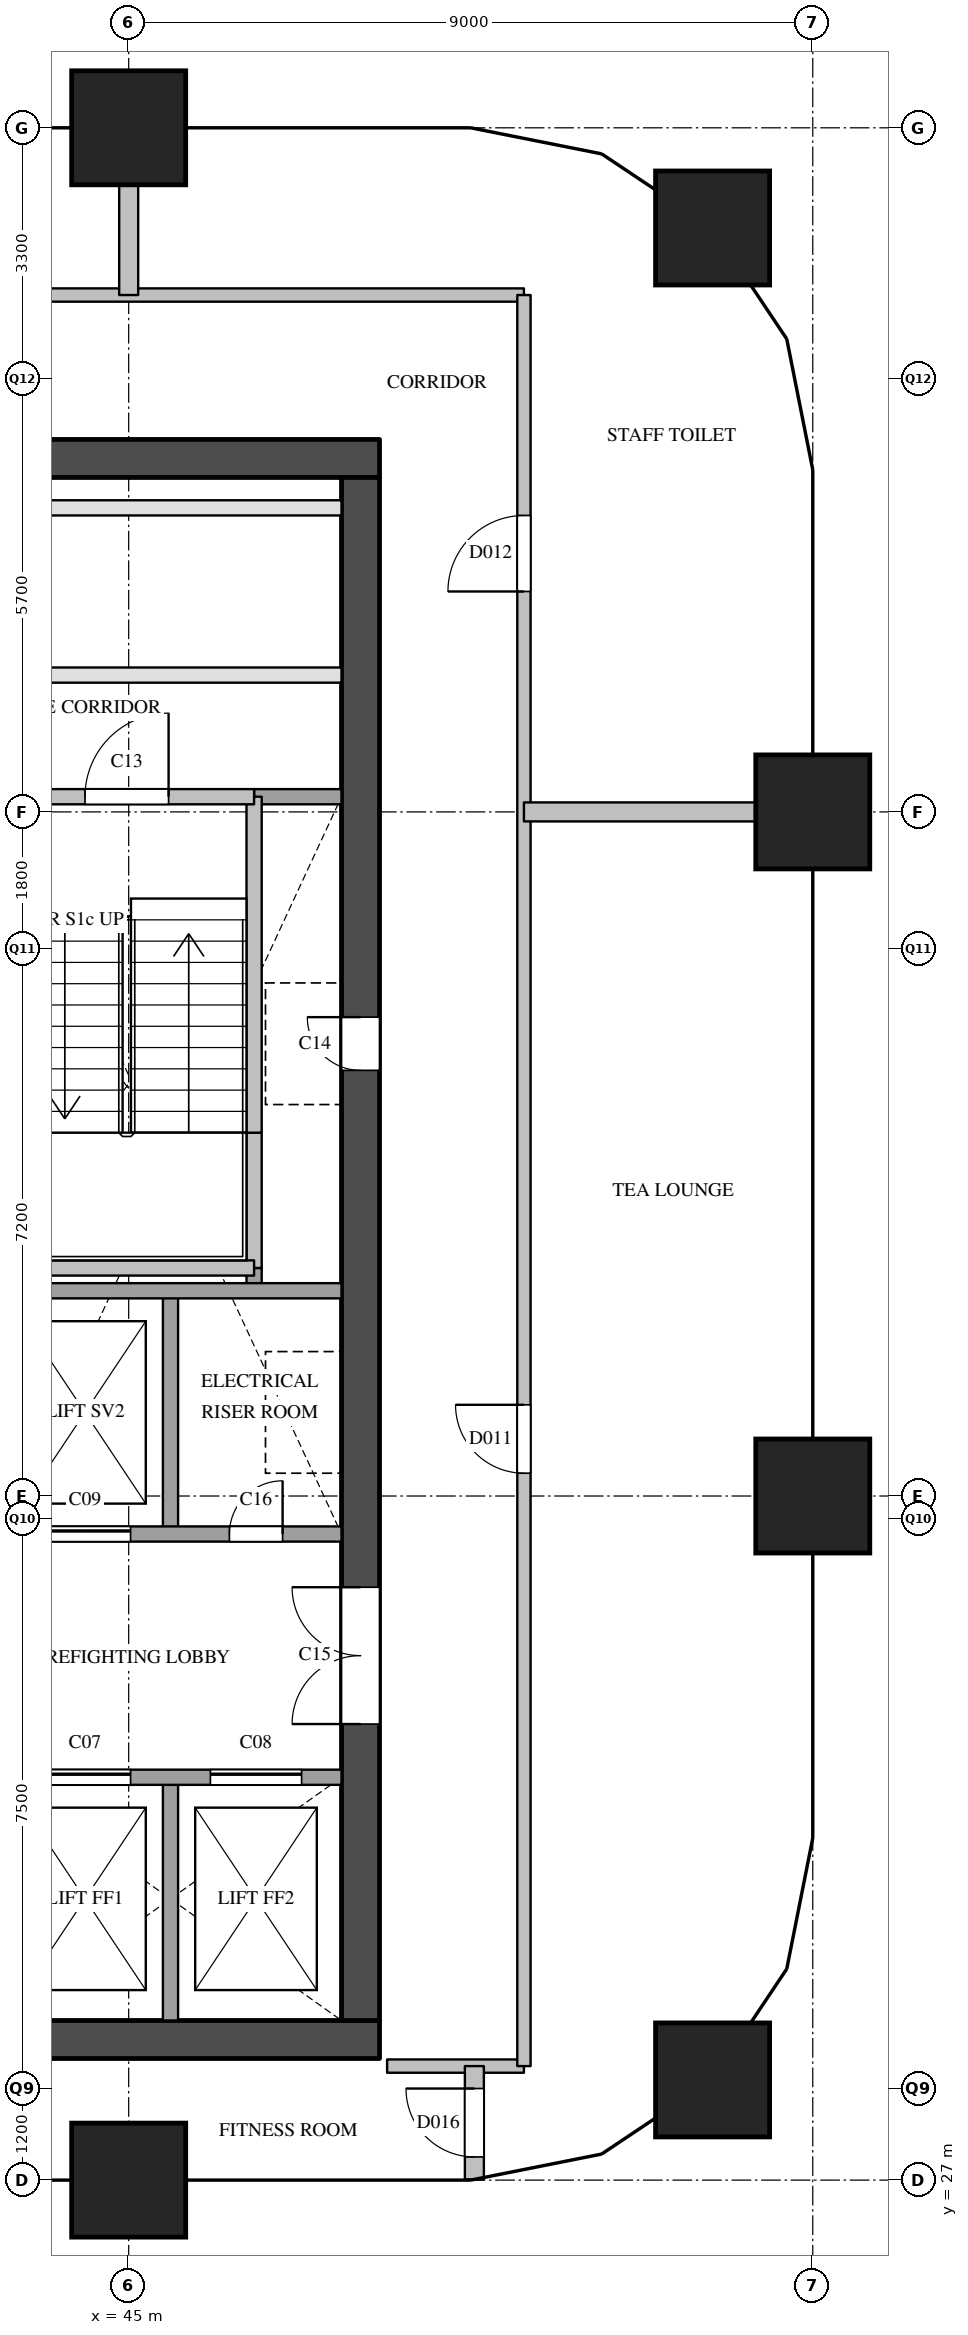
"""IFC4 building model, lengths in metres.
Left out: names, types, materials, properties, quantities, classifications, styles, units other than length and angle.
Written with IfcOpenShell. Run it as: python <this file> out.ifc"""

import sys

from ifc_helpers import new_model, si_unit, direction, frame, frame_2d, origin, origin_2d, place, context, subcontext, project, spatial, rectangle, extrude, element, fill, save


model = new_model("IFC4")
c1 = context("Model", 3, precision=1e-05, world=origin(), true_north=direction((0.0, 1.0)))
c2 = subcontext(c1, "Body", "Model", "MODEL_VIEW")
j1 = project(units=[si_unit("LENGTHUNIT", "METRE"), si_unit("PLANEANGLEUNIT", "RADIAN")], contexts=[c1])
p1 = place(None, origin())
s1 = spatial("IfcSite", under=j1, at=p1, CompositionType="ELEMENT")
p2 = place(p1, origin())
s2 = spatial("IfcBuilding", under=s1, at=p2, CompositionType="ELEMENT")
p3 = place(p2, frame((0.0, 0.0, 170.0)))
s3 = spatial("IfcBuildingStorey", under=s2, at=p3, CompositionType="ELEMENT", Elevation=170.0)
for number, where, z_axis, x_axis in (
    (1, (45.0, 27.0, 0.0), (0.0, 0.0, 1.0), (1.0, 0.0, 0.0)),
    (2, (45.0, 54.0, 0.0), (0.0, 0.0, 1.0), (1.0, 0.0, 0.0)),
    (3, (52.682, 28.318, 0.0), (0.0, 0.0, 1.0), (1.0, 0.0, 0.0)),
    (4, (54.0, 36.0, 0.0), (0.0, 0.0, 1.0), (1.0, 0.0, 0.0)),
    (5, (54.0, 45.0, 0.0), (0.0, 0.0, 1.0), (1.0, 0.0, 0.0)),
    (6, (52.682, 52.682, 0.0), (0.0, 0.0, 1.0), (1.0, 0.0, 0.0)),
):
    element("IfcColumn", number, at=place(p3, frame(where, z_axis=z_axis, x_axis=x_axis)), inside=s3, PredefinedType="COLUMN", context=c2, shape_type="SweptSolid", body=[
        extrude(rectangle(XDim=1.5, YDim=1.5, at=origin_2d()), origin(), (0.0, 0.0, 1.0), 3.9),
    ])
p4 = place(p3, frame((36.1, 28.85, 0.0), z_axis=(0.0, 0.0, 1.0), x_axis=(1.0, 0.0, 0.0)))
e7 = element("IfcWall", 7, at=p4, inside=s3, PredefinedType="SHEAR", context=c2, shape_type="SweptSolid", body=[
    extrude(rectangle(XDim=12.2, YDim=0.5, at=frame_2d((6.1, 0.0))), origin(), (0.0, 0.0, 1.0), 3.6),
])
p5 = place(p4, frame((0.95, 0.0, 0.0)))
e8 = element("IfcOpeningElement", 8, at=p5, cuts=e7, PredefinedType="OPENING", context=c2, shape_type="SweptSolid", body=[
    extrude(rectangle(XDim=1.2, YDim=2.1, at=frame_2d((0.6, 1.05))), frame((0.0, 0.26, 0.0), z_axis=(0.0, -1.0, 0.0), x_axis=(1.0, 0.0, 0.0)), (0.0, 0.0, 1.0), 0.52),
])
p6 = place(p4, frame((3.05, 0.0, 0.0)))
e9 = element("IfcOpeningElement", 9, at=p6, cuts=e7, PredefinedType="OPENING", context=c2, shape_type="SweptSolid", body=[
    extrude(rectangle(XDim=1.2, YDim=2.1, at=frame_2d((0.6, 1.05))), frame((0.0, 0.26, 0.0), z_axis=(0.0, -1.0, 0.0), x_axis=(1.0, 0.0, 0.0)), (0.0, 0.0, 1.0), 0.52),
])
p7 = place(p4, frame((5.15, 0.0, 0.0)))
e10 = element("IfcOpeningElement", 10, at=p7, cuts=e7, PredefinedType="OPENING", context=c2, shape_type="SweptSolid", body=[
    extrude(rectangle(XDim=1.2, YDim=2.1, at=frame_2d((0.6, 1.05))), frame((0.0, 0.26, 0.0), z_axis=(0.0, -1.0, 0.0), x_axis=(1.0, 0.0, 0.0)), (0.0, 0.0, 1.0), 0.52),
])
p8 = place(p3, frame((36.1, 49.65, 0.0), z_axis=(0.0, 0.0, 1.0), x_axis=(1.0, 0.0, 0.0)))
e11 = element("IfcWall", 11, at=p8, inside=s3, PredefinedType="SHEAR", context=c2, shape_type="SweptSolid", body=[
    extrude(rectangle(XDim=12.2, YDim=0.5, at=frame_2d((6.1, 0.0))), origin(), (0.0, 0.0, 1.0), 3.6),
])
p9 = place(p3, frame((48.05, 29.1, 0.0), z_axis=(0.0, 0.0, 1.0), x_axis=(0.0, 1.0, 0.0)))
e12 = element("IfcWall", 12, at=p9, inside=s3, PredefinedType="SHEAR", context=c2, shape_type="SweptSolid", body=[
    extrude(rectangle(XDim=20.3, YDim=0.5, at=frame_2d((10.15, 0.0))), origin(), (0.0, 0.0, 1.0), 3.6),
])
p10 = place(p9, frame((12.5, 0.0, 0.0)))
e13 = element("IfcOpeningElement", 13, at=p10, cuts=e12, PredefinedType="OPENING", context=c2, shape_type="SweptSolid", body=[
    extrude(rectangle(XDim=0.7, YDim=2.1, at=frame_2d((0.35, 1.05))), frame((0.0, 0.26, 0.0), z_axis=(0.0, -1.0, 0.0), x_axis=(1.0, 0.0, 0.0)), (0.0, 0.0, 1.0), 0.52),
])
p11 = place(p9, frame((3.9, 0.0, 0.0)))
e14 = element("IfcOpeningElement", 14, at=p11, cuts=e12, PredefinedType="OPENING", context=c2, shape_type="SweptSolid", body=[
    extrude(rectangle(XDim=1.8, YDim=2.1, at=frame_2d((0.9, 1.05))), frame((0.0, 0.26, 0.0), z_axis=(0.0, -1.0, 0.0), x_axis=(1.0, 0.0, 0.0)), (0.0, 0.0, 1.0), 0.52),
])
for number, where, z_axis, x_axis in (
    (15, (45.55, 29.1, 0.0), (0.0, 0.0, 1.0), (0.0, 1.0, 0.0)),
    (16, (45.55, 35.5, 0.0), (0.0, 0.0, 1.0), (0.0, 1.0, 0.0)),
):
    element("IfcWall", number, at=place(p3, frame(where, z_axis=z_axis, x_axis=x_axis)), inside=s3, PredefinedType="SOLIDWALL", context=c2, shape_type="SweptSolid", body=[
        extrude(rectangle(XDim=3.2, YDim=0.2, at=frame_2d((1.6, 0.0))), origin(), (0.0, 0.0, 1.0), 3.6),
    ])
p12 = place(p3, frame((46.65, 38.7, 0.0), z_axis=(0.0, 0.0, 1.0), x_axis=(0.0, 1.0, 0.0)))
e17 = element("IfcWall", 17, at=p12, inside=s3, PredefinedType="SOLIDWALL", context=c2, shape_type="SweptSolid", body=[
    extrude(rectangle(XDim=0.3, YDim=0.2, at=frame_2d((0.15, 0.0))), origin(), (0.0, 0.0, 1.0), 3.6),
])
p13 = place(p3, frame((46.65, 39.0, 0.0), z_axis=(0.0, 0.0, 1.0), x_axis=(0.0, 1.0, 0.0)))
e18 = element("IfcWall", 18, at=p13, inside=s3, PredefinedType="SOLIDWALL", context=c2, shape_type="SweptSolid", body=[
    extrude(rectangle(XDim=1.78, YDim=0.2, at=frame_2d((0.89, 0.0))), origin(), (0.0, 0.0, 1.0), 3.6),
])
p14 = place(p3, frame((46.65, 40.78, 0.0), z_axis=(0.0, 0.0, 1.0), x_axis=(0.0, 1.0, 0.0)))
e19 = element("IfcWall", 19, at=p14, inside=s3, PredefinedType="SOLIDWALL", context=c2, shape_type="SweptSolid", body=[
    extrude(rectangle(XDim=4.42, YDim=0.2, at=frame_2d((2.21, 0.0))), origin(), (0.0, 0.0, 1.0), 3.6),
])
p15 = place(p3, frame((36.6, 32.3, 0.0), z_axis=(0.0, 0.0, 1.0), x_axis=(1.0, 0.0, 0.0)))
e20 = element("IfcWall", 20, at=p15, inside=s3, PredefinedType="SOLIDWALL", context=c2, shape_type="SweptSolid", body=[
    extrude(rectangle(XDim=11.2, YDim=0.2, at=frame_2d((5.6, 0.0))), origin(), (0.0, 0.0, 1.0), 3.6),
])
p16 = place(p15, frame((7.225, 0.0, 0.0)))
e21 = element("IfcOpeningElement", 21, at=p16, cuts=e20, PredefinedType="OPENING", context=c2, shape_type="SweptSolid", body=[
    extrude(rectangle(XDim=1.2, YDim=2.1, at=frame_2d((0.6, 1.05))), frame((0.0, 0.11, 0.0), z_axis=(0.0, -1.0, 0.0), x_axis=(1.0, 0.0, 0.0)), (0.0, 0.0, 1.0), 0.22),
])
p17 = place(p15, frame((9.475, 0.0, 0.0)))
e22 = element("IfcOpeningElement", 22, at=p17, cuts=e20, PredefinedType="OPENING", context=c2, shape_type="SweptSolid", body=[
    extrude(rectangle(XDim=1.2, YDim=2.1, at=frame_2d((0.6, 1.05))), frame((0.0, 0.11, 0.0), z_axis=(0.0, -1.0, 0.0), x_axis=(1.0, 0.0, 0.0)), (0.0, 0.0, 1.0), 0.22),
])
p18 = place(p3, frame((43.3, 35.5, 0.0), z_axis=(0.0, 0.0, 1.0), x_axis=(1.0, 0.0, 0.0)))
e23 = element("IfcWall", 23, at=p18, inside=s3, PredefinedType="SOLIDWALL", context=c2, shape_type="SweptSolid", body=[
    extrude(rectangle(XDim=4.5, YDim=0.2, at=frame_2d((2.25, 0.0))), origin(), (0.0, 0.0, 1.0), 3.6),
])
p19 = place(p18, frame((0.525, 0.0, 0.0)))
e24 = element("IfcOpeningElement", 24, at=p19, cuts=e23, PredefinedType="OPENING", context=c2, shape_type="SweptSolid", body=[
    extrude(rectangle(XDim=1.2, YDim=2.1, at=frame_2d((0.6, 1.05))), frame((0.0, 0.11, 0.0), z_axis=(0.0, -1.0, 0.0), x_axis=(1.0, 0.0, 0.0)), (0.0, 0.0, 1.0), 0.22),
])
p20 = place(p18, frame((3.025, 0.0, 0.0)))
e25 = element("IfcOpeningElement", 25, at=p20, cuts=e23, PredefinedType="OPENING", context=c2, shape_type="SweptSolid", body=[
    extrude(rectangle(XDim=0.7, YDim=2.1, at=frame_2d((0.35, 1.05))), frame((0.0, 0.11, 0.0), z_axis=(0.0, -1.0, 0.0), x_axis=(1.0, 0.0, 0.0)), (0.0, 0.0, 1.0), 0.22),
])
p21 = place(p3, frame((43.3, 38.7, 0.0), z_axis=(0.0, 0.0, 1.0), x_axis=(1.0, 0.0, 0.0)))
e26 = element("IfcWall", 26, at=p21, inside=s3, PredefinedType="SOLIDWALL", context=c2, shape_type="SweptSolid", body=[
    extrude(rectangle(XDim=4.5, YDim=0.2, at=frame_2d((2.25, 0.0))), origin(), (0.0, 0.0, 1.0), 3.6),
])
p22 = place(p3, frame((43.4, 39.0, 0.0), z_axis=(0.0, 0.0, 1.0), x_axis=(1.0, 0.0, 0.0)))
e27 = element("IfcWall", 27, at=p22, inside=s3, PredefinedType="SOLIDWALL", context=c2, shape_type="SweptSolid", body=[
    extrude(rectangle(XDim=3.25, YDim=0.2, at=frame_2d((1.625, 0.0))), origin(), (0.0, 0.0, 1.0), 3.6),
])
p23 = place(p3, frame((46.65, 45.2, 0.0), z_axis=(0.0, 0.0, 1.0), x_axis=(1.0, 0.0, 0.0)))
e28 = element("IfcWall", 28, at=p23, inside=s3, PredefinedType="SOLIDWALL", context=c2, shape_type="SweptSolid", body=[
    extrude(rectangle(XDim=1.15, YDim=0.2, at=frame_2d((0.575, 0.0))), origin(), (0.0, 0.0, 1.0), 3.6),
])
p24 = place(p3, frame((36.6, 45.2, 0.0), z_axis=(0.0, 0.0, 1.0), x_axis=(1.0, 0.0, 0.0)))
e29 = element("IfcWall", 29, at=p24, inside=s3, PredefinedType="SOLIDWALL", context=c2, shape_type="SweptSolid", body=[
    extrude(rectangle(XDim=10.05, YDim=0.2, at=frame_2d((5.025, 0.0))), origin(), (0.0, 0.0, 1.0), 3.6),
])
p25 = place(p24, frame((1.125, 0.0, 0.0)))
e30 = element("IfcOpeningElement", 30, at=p25, cuts=e29, PredefinedType="OPENING", context=c2, shape_type="SweptSolid", body=[
    extrude(rectangle(XDim=1.1, YDim=2.1, at=frame_2d((0.55, 1.05))), frame((0.0, 0.11, 0.0), z_axis=(0.0, -1.0, 0.0), x_axis=(1.0, 0.0, 0.0)), (0.0, 0.0, 1.0), 0.22),
])
p26 = place(p24, frame((4.475, 0.0, 0.0)))
e31 = element("IfcOpeningElement", 31, at=p26, cuts=e29, PredefinedType="OPENING", context=c2, shape_type="SweptSolid", body=[
    extrude(rectangle(XDim=1.1, YDim=2.1, at=frame_2d((0.55, 1.05))), frame((0.0, 0.11, 0.0), z_axis=(0.0, -1.0, 0.0), x_axis=(1.0, 0.0, 0.0)), (0.0, 0.0, 1.0), 0.22),
])
p27 = place(p24, frame((7.825, 0.0, 0.0)))
e32 = element("IfcOpeningElement", 32, at=p27, cuts=e29, PredefinedType="OPENING", context=c2, shape_type="SweptSolid", body=[
    extrude(rectangle(XDim=1.1, YDim=2.1, at=frame_2d((0.55, 1.05))), frame((0.0, 0.11, 0.0), z_axis=(0.0, -1.0, 0.0), x_axis=(1.0, 0.0, 0.0)), (0.0, 0.0, 1.0), 0.22),
])
p28 = place(p3, frame((36.6, 46.8, 0.0), z_axis=(0.0, 0.0, 1.0), x_axis=(1.0, 0.0, 0.0)))
e33 = element("IfcWall", 33, at=p28, inside=s3, PredefinedType="PARTITIONING", context=c2, shape_type="SweptSolid", body=[
    extrude(rectangle(XDim=11.2, YDim=0.2, at=frame_2d((5.6, 0.0))), origin(), (0.0, 0.0, 1.0), 3.6),
])
p29 = place(p28, frame((5.15, 0.0, 0.0)))
e34 = element("IfcOpeningElement", 34, at=p29, cuts=e33, PredefinedType="OPENING", context=c2, shape_type="SweptSolid", body=[
    extrude(rectangle(XDim=0.9, YDim=2.1, at=frame_2d((0.45, 1.05))), frame((0.0, 0.11, 0.0), z_axis=(0.0, -1.0, 0.0), x_axis=(1.0, 0.0, 0.0)), (0.0, 0.0, 1.0), 0.22),
])
p30 = place(p3, frame((36.6, 49.0, 0.0), z_axis=(0.0, 0.0, 1.0), x_axis=(1.0, 0.0, 0.0)))
e35 = element("IfcWall", 35, at=p30, inside=s3, PredefinedType="PARTITIONING", context=c2, shape_type="SweptSolid", body=[
    extrude(rectangle(XDim=11.2, YDim=0.2, at=frame_2d((5.6, 0.0))), origin(), (0.0, 0.0, 1.0), 3.6),
])
p31 = place(p3, frame((48.4, 28.5, 0.0), z_axis=(0.0, 0.0, 1.0), x_axis=(1.0, 0.0, 0.0)))
e36 = element("IfcWall", 36, at=p31, inside=s3, PredefinedType="PARTITIONING", context=c2, shape_type="SweptSolid", body=[
    extrude(rectangle(XDim=1.8, YDim=0.175, at=frame_2d((0.9, 0.0))), origin(), (0.0, 0.0, 1.0), 3.6),
])
p32 = place(p3, frame((34.2, 51.8, 0.0), z_axis=(0.0, 0.0, 1.0), x_axis=(1.0, 0.0, 0.0)))
e37 = element("IfcWall", 37, at=p32, inside=s3, PredefinedType="PARTITIONING", context=c2, shape_type="SweptSolid", body=[
    extrude(rectangle(XDim=16.0, YDim=0.175, at=frame_2d((8.0, 0.0))), origin(), (0.0, 0.0, 1.0), 3.6),
])
p33 = place(p32, frame((4.95, 0.0, 0.0)))
e38 = element("IfcOpeningElement", 38, at=p33, cuts=e37, PredefinedType="OPENING", context=c2, shape_type="SweptSolid", body=[
    extrude(rectangle(XDim=0.9, YDim=2.1, at=frame_2d((0.45, 1.05))), frame((0.0, 0.097, 0.0), z_axis=(0.0, -1.0, 0.0), x_axis=(1.0, 0.0, 0.0)), (0.0, 0.0, 1.0), 0.195),
])
p34 = place(p3, frame((50.2, 28.5, 0.0), z_axis=(0.0, 0.0, 1.0), x_axis=(0.0, 1.0, 0.0)))
e39 = element("IfcWall", 39, at=p34, inside=s3, PredefinedType="PARTITIONING", context=c2, shape_type="SweptSolid", body=[
    extrude(rectangle(XDim=23.3, YDim=0.175, at=frame_2d((11.65, 0.0))), origin(), (0.0, 0.0, 1.0), 3.6),
])
p35 = place(p34, frame((7.8, 0.0, 0.0)))
e40 = element("IfcOpeningElement", 40, at=p35, cuts=e39, PredefinedType="OPENING", context=c2, shape_type="SweptSolid", body=[
    extrude(rectangle(XDim=0.9, YDim=2.1, at=frame_2d((0.45, 1.05))), frame((0.0, 0.097, 0.0), z_axis=(0.0, -1.0, 0.0), x_axis=(1.0, 0.0, 0.0)), (0.0, 0.0, 1.0), 0.195),
])
p36 = place(p34, frame((19.4, 0.0, 0.0)))
e41 = element("IfcOpeningElement", 41, at=p36, cuts=e39, PredefinedType="OPENING", context=c2, shape_type="SweptSolid", body=[
    extrude(rectangle(XDim=1.0, YDim=2.1, at=frame_2d((0.5, 1.05))), frame((0.0, 0.097, 0.0), z_axis=(0.0, -1.0, 0.0), x_axis=(1.0, 0.0, 0.0)), (0.0, 0.0, 1.0), 0.195),
])
p37 = place(p3, frame((50.2, 45.0, 0.0), z_axis=(0.0, 0.0, 1.0), x_axis=(1.0, 0.0, 0.0)))
e42 = element("IfcWall", 42, at=p37, inside=s3, PredefinedType="PARTITIONING", context=c2, shape_type="SweptSolid", body=[
    extrude(rectangle(XDim=3.8, YDim=0.25, at=frame_2d((1.9, 0.0))), origin(), (0.0, 0.0, 1.0), 3.6),
])
p38 = place(p3, frame((45.0, 51.8, 0.0), z_axis=(0.0, 0.0, 1.0), x_axis=(0.0, 1.0, 0.0)))
e43 = element("IfcWall", 43, at=p38, inside=s3, PredefinedType="PARTITIONING", context=c2, shape_type="SweptSolid", body=[
    extrude(rectangle(XDim=2.2, YDim=0.25, at=frame_2d((1.1, 0.0))), origin(), (0.0, 0.0, 1.0), 3.6),
])
p39 = place(p3, frame((49.548, 27.01, 0.0), z_axis=(0.0, 0.0, 1.0), x_axis=(0.0, 1.0, 0.0)))
e44 = element("IfcWall", 44, at=p39, inside=s3, PredefinedType="PARTITIONING", context=c2, shape_type="SweptSolid", body=[
    extrude(rectangle(XDim=1.49, YDim=0.25, at=frame_2d((0.745, 0.0))), origin(), (0.0, 0.0, 1.0), 2.6),
])
p40 = place(p39, frame((0.295, 0.0, 0.0)))
e45 = element("IfcOpeningElement", 45, at=p40, cuts=e44, PredefinedType="OPENING", context=c2, shape_type="SweptSolid", body=[
    extrude(rectangle(XDim=0.9, YDim=2.1, at=frame_2d((0.45, 1.05))), frame((0.0, 0.135, 0.0), z_axis=(0.0, -1.0, 0.0), x_axis=(1.0, 0.0, 0.0)), (0.0, 0.0, 1.0), 0.27),
])
p41 = place(p16, origin())
e46 = element("IfcDoor", 46, at=p41, inside=s3, OperationType="SLIDING_TO_LEFT", PredefinedType="DOOR", context=c2, shape_type="SweptSolid", body=[
    extrude(rectangle(XDim=1.2, YDim=2.1, at=frame_2d((0.6, 1.05))), frame((0.0, 0.025, 0.0), z_axis=(0.0, -1.0, 0.0), x_axis=(1.0, 0.0, 0.0)), (0.0, 0.0, 1.0), 0.05),
])
fill(e21, e46)
p42 = place(p17, origin())
e47 = element("IfcDoor", 47, at=p42, inside=s3, OperationType="SLIDING_TO_LEFT", PredefinedType="DOOR", context=c2, shape_type="SweptSolid", body=[
    extrude(rectangle(XDim=1.2, YDim=2.1, at=frame_2d((0.6, 1.05))), frame((0.0, 0.025, 0.0), z_axis=(0.0, -1.0, 0.0), x_axis=(1.0, 0.0, 0.0)), (0.0, 0.0, 1.0), 0.05),
])
fill(e22, e47)
p43 = place(p19, origin())
e48 = element("IfcDoor", 48, at=p43, inside=s3, OperationType="SLIDING_TO_LEFT", PredefinedType="DOOR", context=c2, shape_type="SweptSolid", body=[
    extrude(rectangle(XDim=1.2, YDim=2.1, at=frame_2d((0.6, 1.05))), frame((0.0, 0.025, 0.0), z_axis=(0.0, -1.0, 0.0), x_axis=(1.0, 0.0, 0.0)), (0.0, 0.0, 1.0), 0.05),
])
fill(e24, e48)
p44 = place(p27, origin())
e49 = element("IfcDoor", 49, at=p44, inside=s3, OperationType="SINGLE_SWING_RIGHT", PredefinedType="DOOR", context=c2, shape_type="SweptSolid", body=[
    extrude(rectangle(XDim=1.1, YDim=2.1, at=frame_2d((0.55, 1.05))), frame((0.0, 0.025, 0.0), z_axis=(0.0, -1.0, 0.0), x_axis=(1.0, 0.0, 0.0)), (0.0, 0.0, 1.0), 0.05),
])
fill(e32, e49)
p45 = place(p10, origin())
e50 = element("IfcDoor", 50, at=p45, inside=s3, OperationType="SINGLE_SWING_RIGHT", PredefinedType="DOOR", context=c2, shape_type="SweptSolid", body=[
    extrude(rectangle(XDim=0.7, YDim=2.1, at=frame_2d((0.35, 1.05))), frame((0.0, 0.025, 0.0), z_axis=(0.0, -1.0, 0.0), x_axis=(1.0, 0.0, 0.0)), (0.0, 0.0, 1.0), 0.05),
])
fill(e13, e50)
p46 = place(p11, origin())
e51 = element("IfcDoor", 51, at=p46, inside=s3, OperationType="DOUBLE_DOOR_SINGLE_SWING", PredefinedType="DOOR", context=c2, shape_type="SweptSolid", body=[
    extrude(rectangle(XDim=1.8, YDim=2.1, at=frame_2d((0.9, 1.05))), frame((0.0, 0.025, 0.0), z_axis=(0.0, -1.0, 0.0), x_axis=(1.0, 0.0, 0.0)), (0.0, 0.0, 1.0), 0.05),
])
fill(e14, e51)
p47 = place(p20, origin())
e52 = element("IfcDoor", 52, at=p47, inside=s3, OperationType="SINGLE_SWING_RIGHT", PredefinedType="DOOR", context=c2, shape_type="SweptSolid", body=[
    extrude(rectangle(XDim=0.7, YDim=2.1, at=frame_2d((0.35, 1.05))), frame((0.0, 0.025, 0.0), z_axis=(0.0, -1.0, 0.0), x_axis=(1.0, 0.0, 0.0)), (0.0, 0.0, 1.0), 0.05),
])
fill(e25, e52)
p48 = place(p35, origin())
e53 = element("IfcDoor", 53, at=p48, inside=s3, OperationType="SINGLE_SWING_RIGHT", PredefinedType="DOOR", context=c2, shape_type="SweptSolid", body=[
    extrude(rectangle(XDim=0.9, YDim=2.1, at=frame_2d((0.45, 1.05))), frame((0.0, 0.025, 0.0), z_axis=(0.0, -1.0, 0.0), x_axis=(1.0, 0.0, 0.0)), (0.0, 0.0, 1.0), 0.05),
])
fill(e40, e53)
p49 = place(p36, origin())
e54 = element("IfcDoor", 54, at=p49, inside=s3, OperationType="SINGLE_SWING_LEFT", PredefinedType="DOOR", context=c2, shape_type="SweptSolid", body=[
    extrude(rectangle(XDim=1.0, YDim=2.1, at=frame_2d((0.5, 1.05))), frame((0.0, 0.025, 0.0), z_axis=(0.0, -1.0, 0.0), x_axis=(1.0, 0.0, 0.0)), (0.0, 0.0, 1.0), 0.05),
])
fill(e41, e54)
p50 = place(p40, origin())
e55 = element("IfcDoor", 55, at=p50, inside=s3, OperationType="SINGLE_SWING_RIGHT", PredefinedType="DOOR", context=c2, shape_type="SweptSolid", body=[
    extrude(rectangle(XDim=0.9, YDim=2.1, at=frame_2d((0.45, 1.05))), frame((0.0, 0.025, 0.0), z_axis=(0.0, -1.0, 0.0), x_axis=(1.0, 0.0, 0.0)), (0.0, 0.0, 1.0), 0.05),
])
fill(e45, e55)
save(model, sys.argv[1])
